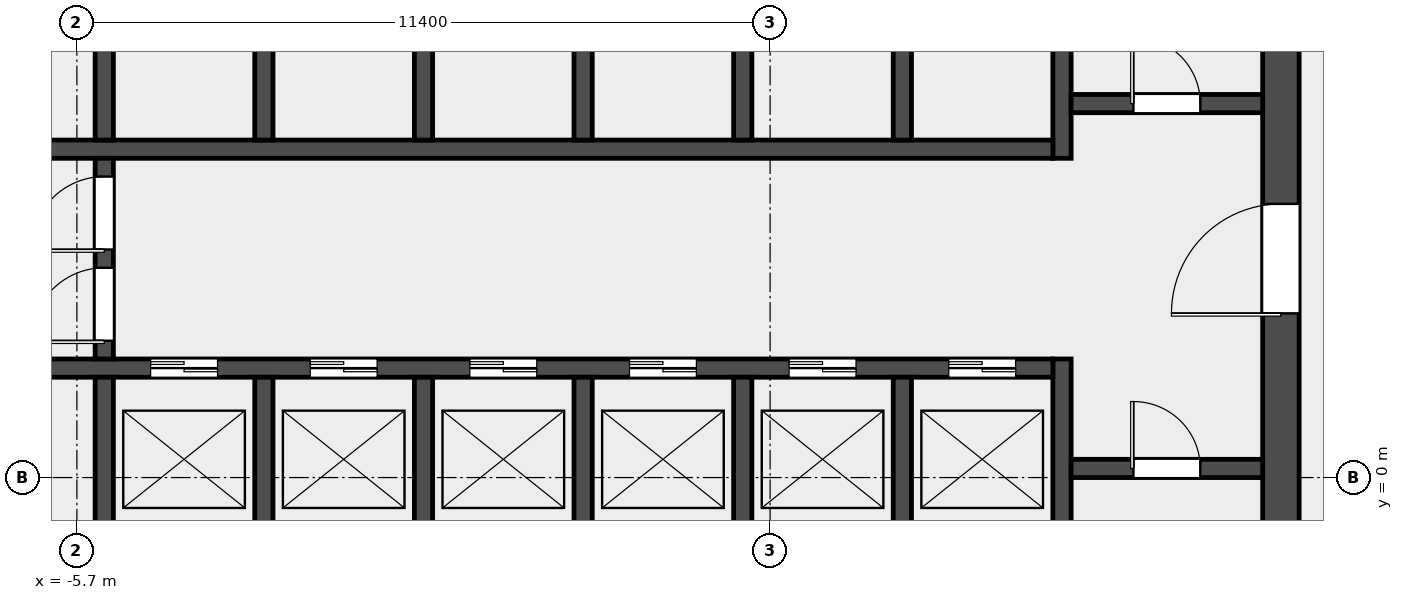
"""IFC4 building model, lengths in metres.
Left out: names, types, materials, properties, quantities, classifications, styles, units other than length and angle.
Written with IfcOpenShell. Run it as: python <this file> out.ifc"""

import sys

from ifc_helpers import new_model, si_unit, direction, frame, frame_2d, origin, place, context, subcontext, project, spatial, rectangle, extrude, element, fill, save


model = new_model("IFC4")
c1 = context("Model", 3, precision=1e-05, world=origin(), true_north=direction((0.0, 1.0)))
c2 = subcontext(c1, "Body", "Model", "MODEL_VIEW")
j1 = project(units=[si_unit("LENGTHUNIT", "METRE"), si_unit("PLANEANGLEUNIT", "RADIAN")], contexts=[c1])
p1 = place(None, origin())
s1 = spatial("IfcSite", under=j1, at=p1, CompositionType="ELEMENT")
p2 = place(p1, origin())
s2 = spatial("IfcBuilding", under=s1, at=p2, CompositionType="ELEMENT")
p3 = place(p2, frame((0.0, 0.0, 9.0)))
s3 = spatial("IfcBuildingStorey", under=s2, at=p3, CompositionType="ELEMENT", Elevation=9.0)
p4 = place(p3, frame((14.1, -6.6, 0.0), z_axis=(0.0, 0.0, 1.0), x_axis=(0.0, 1.0, 0.0)))
e1 = element("IfcWall", 1, at=p4, inside=s3, PredefinedType="SHEAR", context=c2, shape_type="SweptSolid", body=[
    extrude(rectangle(XDim=19.5, YDim=0.6, at=frame_2d((9.75, 0.0))), origin(), (0.0, 0.0, 1.0), 5.2),
])
p5 = place(p4, frame((9.3, 0.0, 0.0)))
e2 = element("IfcOpeningElement", 2, at=p5, cuts=e1, PredefinedType="OPENING", context=c2, shape_type="SweptSolid", body=[
    extrude(rectangle(XDim=1.8, YDim=2.1, at=frame_2d((0.9, 1.05))), frame((0.0, 0.312, 0.0), z_axis=(0.0, -1.0, 0.0), x_axis=(1.0, 0.0, 0.0)), (0.0, 0.0, 1.0), 0.624),
])
p6 = place(p3, frame((10.5, -6.6, 0.0), z_axis=(0.0, 0.0, 1.0), x_axis=(0.0, 1.0, 0.0)))
e3 = element("IfcWall", 3, at=p6, inside=s3, PredefinedType="SHEAR", context=c2, shape_type="SweptSolid", body=[
    extrude(rectangle(XDim=8.55, YDim=0.3, at=frame_2d((4.275, 0.0))), origin(), (0.0, 0.0, 1.0), 5.2),
])
p7 = place(p3, frame((10.5, 5.25, 0.0), z_axis=(0.0, 0.0, 1.0), x_axis=(0.0, 1.0, 0.0)))
e4 = element("IfcWall", 4, at=p7, inside=s3, PredefinedType="SHEAR", context=c2, shape_type="SweptSolid", body=[
    extrude(rectangle(XDim=7.65, YDim=0.3, at=frame_2d((3.825, 0.0))), origin(), (0.0, 0.0, 1.0), 5.2),
])
p8 = place(p3, frame((10.65, 0.15, 0.0), z_axis=(0.0, 0.0, 1.0), x_axis=(1.0, 0.0, 0.0)))
e5 = element("IfcWall", 5, at=p8, inside=s3, PredefinedType="SOLIDWALL", context=c2, shape_type="SweptSolid", body=[
    extrude(rectangle(XDim=3.15, YDim=0.3, at=frame_2d((1.575, 0.0))), origin(), (0.0, 0.0, 1.0), 5.2),
])
p9 = place(p8, frame((1.025, 0.0, 0.0)))
e6 = element("IfcOpeningElement", 6, at=p9, cuts=e5, PredefinedType="OPENING", context=c2, shape_type="SweptSolid", body=[
    extrude(rectangle(XDim=1.1, YDim=2.1, at=frame_2d((0.55, 1.05))), frame((0.0, 0.162, 0.0), z_axis=(0.0, -1.0, 0.0), x_axis=(1.0, 0.0, 0.0)), (0.0, 0.0, 1.0), 0.324),
])
p10 = place(p3, frame((10.65, 6.15, 0.0), z_axis=(0.0, 0.0, 1.0), x_axis=(1.0, 0.0, 0.0)))
e7 = element("IfcWall", 7, at=p10, inside=s3, PredefinedType="SOLIDWALL", context=c2, shape_type="SweptSolid", body=[
    extrude(rectangle(XDim=3.15, YDim=0.3, at=frame_2d((1.575, 0.0))), origin(), (0.0, 0.0, 1.0), 5.2),
])
p11 = place(p10, frame((1.025, 0.0, 0.0)))
e8 = element("IfcOpeningElement", 8, at=p11, cuts=e7, PredefinedType="OPENING", context=c2, shape_type="SweptSolid", body=[
    extrude(rectangle(XDim=1.1, YDim=2.1, at=frame_2d((0.55, 1.05))), frame((0.0, 0.162, 0.0), z_axis=(0.0, -1.0, 0.0), x_axis=(1.0, 0.0, 0.0)), (0.0, 0.0, 1.0), 0.324),
])
p12 = place(p3, frame((-10.35, 1.8, 0.0), z_axis=(0.0, 0.0, 1.0), x_axis=(1.0, 0.0, 0.0)))
e9 = element("IfcWall", 9, at=p12, inside=s3, PredefinedType="SOLIDWALL", context=c2, shape_type="SweptSolid", body=[
    extrude(rectangle(XDim=20.7, YDim=0.3, at=frame_2d((10.35, 0.0))), origin(), (0.0, 0.0, 1.0), 5.2),
])
p13 = place(p12, frame((0.512, 0.0, 0.0)))
e10 = element("IfcOpeningElement", 10, at=p13, cuts=e9, PredefinedType="OPENING", context=c2, shape_type="SweptSolid", body=[
    extrude(rectangle(XDim=1.3, YDim=2.1, at=frame_2d((0.65, 1.05))), frame((0.0, 0.162, 0.0), z_axis=(0.0, -1.0, 0.0), x_axis=(1.0, 0.0, 0.0)), (0.0, 0.0, 1.0), 0.324),
])
p14 = place(p12, frame((5.863, 0.0, 0.0)))
e11 = element("IfcOpeningElement", 11, at=p14, cuts=e9, PredefinedType="OPENING", context=c2, shape_type="SweptSolid", body=[
    extrude(rectangle(XDim=1.1, YDim=2.1, at=frame_2d((0.55, 1.05))), frame((0.0, 0.162, 0.0), z_axis=(0.0, -1.0, 0.0), x_axis=(1.0, 0.0, 0.0)), (0.0, 0.0, 1.0), 0.324),
])
p15 = place(p12, frame((8.488, 0.0, 0.0)))
e12 = element("IfcOpeningElement", 12, at=p15, cuts=e9, PredefinedType="OPENING", context=c2, shape_type="SweptSolid", body=[
    extrude(rectangle(XDim=1.1, YDim=2.1, at=frame_2d((0.55, 1.05))), frame((0.0, 0.162, 0.0), z_axis=(0.0, -1.0, 0.0), x_axis=(1.0, 0.0, 0.0)), (0.0, 0.0, 1.0), 0.324),
])
p16 = place(p12, frame((11.113, 0.0, 0.0)))
e13 = element("IfcOpeningElement", 13, at=p16, cuts=e9, PredefinedType="OPENING", context=c2, shape_type="SweptSolid", body=[
    extrude(rectangle(XDim=1.1, YDim=2.1, at=frame_2d((0.55, 1.05))), frame((0.0, 0.162, 0.0), z_axis=(0.0, -1.0, 0.0), x_axis=(1.0, 0.0, 0.0)), (0.0, 0.0, 1.0), 0.324),
])
p17 = place(p12, frame((13.738, 0.0, 0.0)))
e14 = element("IfcOpeningElement", 14, at=p17, cuts=e9, PredefinedType="OPENING", context=c2, shape_type="SweptSolid", body=[
    extrude(rectangle(XDim=1.1, YDim=2.1, at=frame_2d((0.55, 1.05))), frame((0.0, 0.162, 0.0), z_axis=(0.0, -1.0, 0.0), x_axis=(1.0, 0.0, 0.0)), (0.0, 0.0, 1.0), 0.324),
])
p18 = place(p12, frame((16.363, 0.0, 0.0)))
e15 = element("IfcOpeningElement", 15, at=p18, cuts=e9, PredefinedType="OPENING", context=c2, shape_type="SweptSolid", body=[
    extrude(rectangle(XDim=1.1, YDim=2.1, at=frame_2d((0.55, 1.05))), frame((0.0, 0.162, 0.0), z_axis=(0.0, -1.0, 0.0), x_axis=(1.0, 0.0, 0.0)), (0.0, 0.0, 1.0), 0.324),
])
p19 = place(p12, frame((18.988, 0.0, 0.0)))
e16 = element("IfcOpeningElement", 16, at=p19, cuts=e9, PredefinedType="OPENING", context=c2, shape_type="SweptSolid", body=[
    extrude(rectangle(XDim=1.1, YDim=2.1, at=frame_2d((0.55, 1.05))), frame((0.0, 0.162, 0.0), z_axis=(0.0, -1.0, 0.0), x_axis=(1.0, 0.0, 0.0)), (0.0, 0.0, 1.0), 0.324),
])
p20 = place(p3, frame((-10.35, 5.4, 0.0), z_axis=(0.0, 0.0, 1.0), x_axis=(1.0, 0.0, 0.0)))
e17 = element("IfcWall", 17, at=p20, inside=s3, PredefinedType="SOLIDWALL", context=c2, shape_type="SweptSolid", body=[
    extrude(rectangle(XDim=20.7, YDim=0.3, at=frame_2d((10.35, 0.0))), origin(), (0.0, 0.0, 1.0), 5.2),
])
p21 = place(p20, frame((0.512, 0.0, 0.0)))
e18 = element("IfcOpeningElement", 18, at=p21, cuts=e17, PredefinedType="OPENING", context=c2, shape_type="SweptSolid", body=[
    extrude(rectangle(XDim=1.3, YDim=2.1, at=frame_2d((0.65, 1.05))), frame((0.0, 0.162, 0.0), z_axis=(0.0, -1.0, 0.0), x_axis=(1.0, 0.0, 0.0)), (0.0, 0.0, 1.0), 0.324),
])
for number, where, z_axis, x_axis in (
    (19, (-5.25, -1.05, 0.0), (0.0, 0.0, 1.0), (0.0, 1.0, 0.0)),
    (20, (-2.625, -1.05, 0.0), (0.0, 0.0, 1.0), (0.0, 1.0, 0.0)),
    (21, (0.0, -1.05, 0.0), (0.0, 0.0, 1.0), (0.0, 1.0, 0.0)),
    (22, (2.625, -1.05, 0.0), (0.0, 0.0, 1.0), (0.0, 1.0, 0.0)),
    (23, (5.25, -1.05, 0.0), (0.0, 0.0, 1.0), (0.0, 1.0, 0.0)),
    (24, (7.875, -1.05, 0.0), (0.0, 0.0, 1.0), (0.0, 1.0, 0.0)),
    (25, (-5.25, 5.55, 0.0), (0.0, 0.0, 1.0), (0.0, 1.0, 0.0)),
    (26, (-2.625, 5.55, 0.0), (0.0, 0.0, 1.0), (0.0, 1.0, 0.0)),
    (27, (0.0, 5.55, 0.0), (0.0, 0.0, 1.0), (0.0, 1.0, 0.0)),
    (28, (2.625, 5.55, 0.0), (0.0, 0.0, 1.0), (0.0, 1.0, 0.0)),
    (29, (5.25, 5.55, 0.0), (0.0, 0.0, 1.0), (0.0, 1.0, 0.0)),
    (30, (7.875, 5.55, 0.0), (0.0, 0.0, 1.0), (0.0, 1.0, 0.0)),
):
    element("IfcWall", number, at=place(p3, frame(where, z_axis=z_axis, x_axis=x_axis)), inside=s3, PredefinedType="SOLIDWALL", context=c2, shape_type="SweptSolid", body=[
        extrude(rectangle(XDim=2.7, YDim=0.3, at=frame_2d((1.35, 0.0))), origin(), (0.0, 0.0, 1.0), 5.2),
    ])
p22 = place(p3, frame((-5.25, 1.95, 0.0), z_axis=(0.0, 0.0, 1.0), x_axis=(0.0, 1.0, 0.0)))
e31 = element("IfcWall", 31, at=p22, inside=s3, PredefinedType="SOLIDWALL", context=c2, shape_type="SweptSolid", body=[
    extrude(rectangle(XDim=3.3, YDim=0.3, at=frame_2d((1.65, 0.0))), origin(), (0.0, 0.0, 1.0), 5.2),
])
p23 = place(p22, frame((0.3, 0.0, 0.0)))
e32 = element("IfcOpeningElement", 32, at=p23, cuts=e31, PredefinedType="OPENING", context=c2, shape_type="SweptSolid", body=[
    extrude(rectangle(XDim=1.2, YDim=2.1, at=frame_2d((0.6, 1.05))), frame((0.0, 0.162, 0.0), z_axis=(0.0, -1.0, 0.0), x_axis=(1.0, 0.0, 0.0)), (0.0, 0.0, 1.0), 0.324),
])
p24 = place(p22, frame((1.8, 0.0, 0.0)))
e33 = element("IfcOpeningElement", 33, at=p24, cuts=e31, PredefinedType="OPENING", context=c2, shape_type="SweptSolid", body=[
    extrude(rectangle(XDim=1.2, YDim=2.1, at=frame_2d((0.6, 1.05))), frame((0.0, 0.162, 0.0), z_axis=(0.0, -1.0, 0.0), x_axis=(1.0, 0.0, 0.0)), (0.0, 0.0, 1.0), 0.324),
])
p25 = place(p9, origin())
e34 = element("IfcDoor", 34, at=p25, inside=s3, OperationType="SINGLE_SWING_RIGHT", PredefinedType="DOOR", context=c2, shape_type="SweptSolid", body=[
    extrude(rectangle(XDim=1.1, YDim=2.1, at=frame_2d((0.55, 1.05))), frame((0.0, 0.025, 0.0), z_axis=(0.0, -1.0, 0.0), x_axis=(1.0, 0.0, 0.0)), (0.0, 0.0, 1.0), 0.05),
])
fill(e6, e34)
p26 = place(p11, origin())
e35 = element("IfcDoor", 35, at=p26, inside=s3, OperationType="SINGLE_SWING_RIGHT", PredefinedType="DOOR", context=c2, shape_type="SweptSolid", body=[
    extrude(rectangle(XDim=1.1, YDim=2.1, at=frame_2d((0.55, 1.05))), frame((0.0, 0.025, 0.0), z_axis=(0.0, -1.0, 0.0), x_axis=(1.0, 0.0, 0.0)), (0.0, 0.0, 1.0), 0.05),
])
fill(e8, e35)
p27 = place(p5, origin())
e36 = element("IfcDoor", 36, at=p27, inside=s3, OperationType="DOUBLE_DOOR_SINGLE_SWING", PredefinedType="DOOR", context=c2, shape_type="SweptSolid", body=[
    extrude(rectangle(XDim=1.8, YDim=2.1, at=frame_2d((0.9, 1.05))), frame((0.0, 0.025, 0.0), z_axis=(0.0, -1.0, 0.0), x_axis=(1.0, 0.0, 0.0)), (0.0, 0.0, 1.0), 0.05),
])
fill(e2, e36)
p28 = place(p23, origin())
e37 = element("IfcDoor", 37, at=p28, inside=s3, OperationType="SINGLE_SWING_LEFT", PredefinedType="DOOR", context=c2, shape_type="SweptSolid", body=[
    extrude(rectangle(XDim=1.2, YDim=2.1, at=frame_2d((0.6, 1.05))), frame((0.0, 0.025, 0.0), z_axis=(0.0, -1.0, 0.0), x_axis=(1.0, 0.0, 0.0)), (0.0, 0.0, 1.0), 0.05),
])
fill(e32, e37)
p29 = place(p24, origin())
e38 = element("IfcDoor", 38, at=p29, inside=s3, OperationType="SINGLE_SWING_RIGHT", PredefinedType="DOOR", context=c2, shape_type="SweptSolid", body=[
    extrude(rectangle(XDim=1.2, YDim=2.1, at=frame_2d((0.6, 1.05))), frame((0.0, 0.025, 0.0), z_axis=(0.0, -1.0, 0.0), x_axis=(1.0, 0.0, 0.0)), (0.0, 0.0, 1.0), 0.05),
])
fill(e33, e38)
p30 = place(p14, origin())
e39 = element("IfcDoor", 39, at=p30, inside=s3, OperationType="DOUBLE_DOOR_SLIDING", PredefinedType="DOOR", context=c2, shape_type="SweptSolid", body=[
    extrude(rectangle(XDim=1.1, YDim=2.1, at=frame_2d((0.55, 1.05))), frame((0.0, 0.025, 0.0), z_axis=(0.0, -1.0, 0.0), x_axis=(1.0, 0.0, 0.0)), (0.0, 0.0, 1.0), 0.05),
])
fill(e11, e39)
p31 = place(p15, origin())
e40 = element("IfcDoor", 40, at=p31, inside=s3, OperationType="DOUBLE_DOOR_SLIDING", PredefinedType="DOOR", context=c2, shape_type="SweptSolid", body=[
    extrude(rectangle(XDim=1.1, YDim=2.1, at=frame_2d((0.55, 1.05))), frame((0.0, 0.025, 0.0), z_axis=(0.0, -1.0, 0.0), x_axis=(1.0, 0.0, 0.0)), (0.0, 0.0, 1.0), 0.05),
])
fill(e12, e40)
p32 = place(p16, origin())
e41 = element("IfcDoor", 41, at=p32, inside=s3, OperationType="DOUBLE_DOOR_SLIDING", PredefinedType="DOOR", context=c2, shape_type="SweptSolid", body=[
    extrude(rectangle(XDim=1.1, YDim=2.1, at=frame_2d((0.55, 1.05))), frame((0.0, 0.025, 0.0), z_axis=(0.0, -1.0, 0.0), x_axis=(1.0, 0.0, 0.0)), (0.0, 0.0, 1.0), 0.05),
])
fill(e13, e41)
p33 = place(p17, origin())
e42 = element("IfcDoor", 42, at=p33, inside=s3, OperationType="DOUBLE_DOOR_SLIDING", PredefinedType="DOOR", context=c2, shape_type="SweptSolid", body=[
    extrude(rectangle(XDim=1.1, YDim=2.1, at=frame_2d((0.55, 1.05))), frame((0.0, 0.025, 0.0), z_axis=(0.0, -1.0, 0.0), x_axis=(1.0, 0.0, 0.0)), (0.0, 0.0, 1.0), 0.05),
])
fill(e14, e42)
p34 = place(p18, origin())
e43 = element("IfcDoor", 43, at=p34, inside=s3, OperationType="DOUBLE_DOOR_SLIDING", PredefinedType="DOOR", context=c2, shape_type="SweptSolid", body=[
    extrude(rectangle(XDim=1.1, YDim=2.1, at=frame_2d((0.55, 1.05))), frame((0.0, 0.025, 0.0), z_axis=(0.0, -1.0, 0.0), x_axis=(1.0, 0.0, 0.0)), (0.0, 0.0, 1.0), 0.05),
])
fill(e15, e43)
p35 = place(p19, origin())
e44 = element("IfcDoor", 44, at=p35, inside=s3, OperationType="DOUBLE_DOOR_SLIDING", PredefinedType="DOOR", context=c2, shape_type="SweptSolid", body=[
    extrude(rectangle(XDim=1.1, YDim=2.1, at=frame_2d((0.55, 1.05))), frame((0.0, 0.025, 0.0), z_axis=(0.0, -1.0, 0.0), x_axis=(1.0, 0.0, 0.0)), (0.0, 0.0, 1.0), 0.05),
])
fill(e16, e44)
save(model, sys.argv[1])
